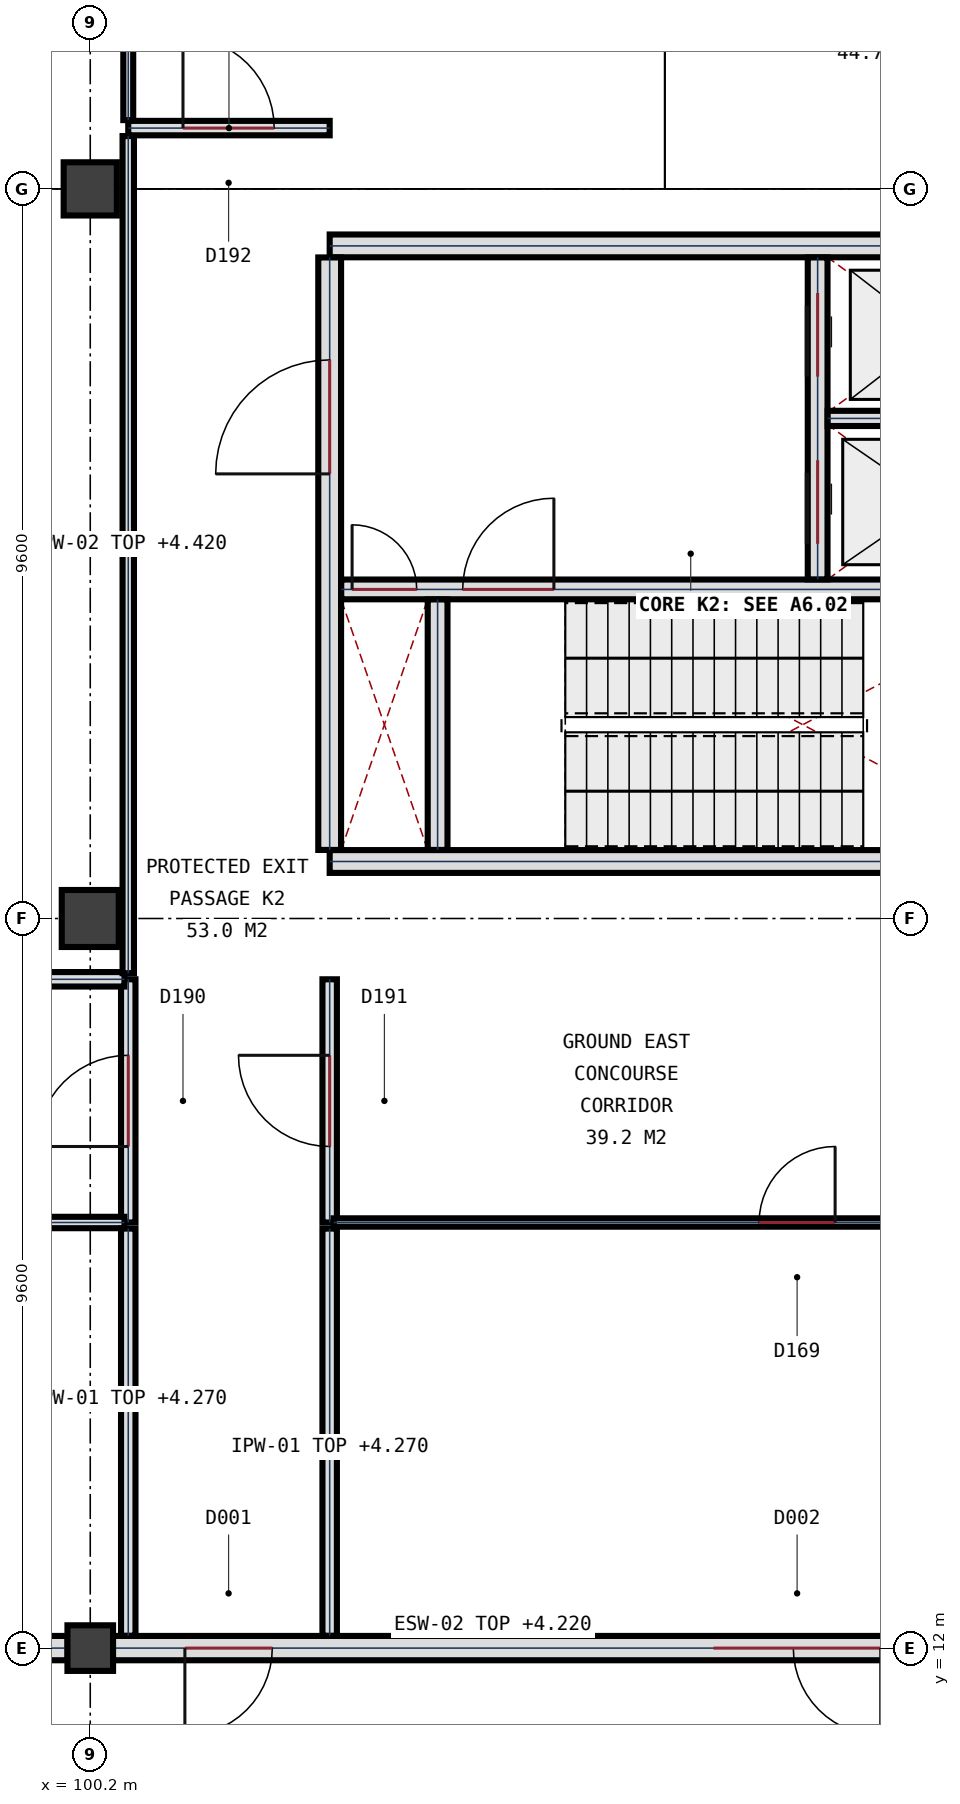
"""IFC4 building model, lengths in metres.
Left out: names, types, materials, properties, quantities, classifications, styles, units other than length and angle.
Written with IfcOpenShell. Run it as: python <this file> out.ifc"""

import sys

from ifc_helpers import new_model, si_unit, direction, frame, frame_2d, origin, origin_2d, place, context, subcontext, project, spatial, rectangle, circle, extrude, element, fill, save


model = new_model("IFC4")
c1 = context("Model", 3, precision=1e-05, world=origin(), true_north=direction((0.0, 1.0)))
c2 = subcontext(c1, "Body", "Model", "MODEL_VIEW")
j1 = project(units=[si_unit("LENGTHUNIT", "METRE"), si_unit("PLANEANGLEUNIT", "RADIAN")], contexts=[c1])
p1 = place(None, origin())
s1 = spatial("IfcSite", under=j1, at=p1, CompositionType="ELEMENT")
p2 = place(p1, origin())
s2 = spatial("IfcBuilding", under=s1, at=p2, CompositionType="ELEMENT")
p3 = place(p2, origin())
s3 = spatial("IfcBuildingStorey", under=s2, at=p3, CompositionType="ELEMENT", Elevation=0.0)
p4 = place(p3, frame((100.2, 12.0, 0.0), z_axis=(0.0, 0.0, 1.0), x_axis=(1.0, 0.0, 0.0)))
e1 = element("IfcColumn", 1, at=p4, inside=s3, PredefinedType="COLUMN", context=c2, shape_type="SweptSolid", body=[
    extrude(circle(Radius=0.3, at=origin_2d()), origin(), (0.0, 0.0, 1.0), 5.4),
])
p5 = place(p3, frame((100.2, 21.6, 0.0), z_axis=(0.0, 0.0, 1.0), x_axis=(1.0, 0.0, 0.0)))
e2 = element("IfcColumn", 2, at=p5, inside=s3, PredefinedType="COLUMN", context=c2, shape_type="SweptSolid", body=[
    extrude(rectangle(XDim=0.75, YDim=0.75, at=origin_2d()), origin(), (0.0, 0.0, 1.0), 5.4),
])
p6 = place(p3, frame((100.2, 31.2, 0.0), z_axis=(0.0, 0.0, 1.0), x_axis=(1.0, 0.0, 0.0)))
e3 = element("IfcColumn", 3, at=p6, inside=s3, PredefinedType="COLUMN", context=c2, shape_type="SweptSolid", body=[
    extrude(rectangle(XDim=0.7, YDim=0.7, at=origin_2d()), origin(), (0.0, 0.0, 1.0), 5.4),
])
p7 = place(p3, frame((113.477, 12.0, 0.0), z_axis=(0.0, 0.0, 1.0), x_axis=(-1.0, 0.0, 0.0)))
e4 = element("IfcWall", 4, at=p7, inside=s3, PredefinedType="SOLIDWALL", context=c2, shape_type="SweptSolid", body=[
    extrude(rectangle(XDim=12.979, YDim=0.32, at=frame_2d((6.49, 0.0))), origin(), (0.0, 0.0, 1.0), 4.22),
])
p8 = place(p7, frame((10.882, 0.0, 0.0)))
e5 = element("IfcOpeningElement", 5, at=p8, cuts=e4, PredefinedType="OPENING", context=c2, shape_type="SweptSolid", body=[
    extrude(rectangle(XDim=1.15, YDim=2.15, at=frame_2d((0.575, 1.075))), frame((0.0, 0.17, 0.0), z_axis=(0.0, -1.0, 0.0), x_axis=(1.0, 0.0, 0.0)), (0.0, 0.0, 1.0), 0.34),
])
p9 = place(p7, frame((2.877, 0.0, 0.0)))
e6 = element("IfcOpeningElement", 6, at=p9, cuts=e4, PredefinedType="OPENING", context=c2, shape_type="SweptSolid", body=[
    extrude(rectangle(XDim=2.2, YDim=2.45, at=frame_2d((1.1, 1.225))), frame((0.0, 0.17, 0.0), z_axis=(0.0, -1.0, 0.0), x_axis=(1.0, 0.0, 0.0)), (0.0, 0.0, 1.0), 0.34),
])
p10 = place(p3, frame((99.902, 12.0, 0.0), z_axis=(0.0, 0.0, 1.0), x_axis=(-1.0, 0.0, 0.0)))
e7 = element("IfcWall", 7, at=p10, inside=s3, PredefinedType="SOLIDWALL", context=c2, shape_type="SweptSolid", body=[
    extrude(rectangle(XDim=12.754, YDim=0.32, at=frame_2d((6.377, 0.0))), origin(), (0.0, 0.0, 1.0), 3.84),
])
p11 = place(p10, frame((2.471, 0.0, 0.0)))
e8 = element("IfcOpeningElement", 8, at=p11, cuts=e7, PredefinedType="OPENING", context=c2, shape_type="SweptSolid", body=[
    extrude(rectangle(XDim=2.2, YDim=2.45, at=frame_2d((1.1, 1.225))), frame((0.0, 0.17, 0.0), z_axis=(0.0, -1.0, 0.0), x_axis=(1.0, 0.0, 0.0)), (0.0, 0.0, 1.0), 0.34),
])
p12 = place(p10, frame((8.083, 0.0, 0.0)))
e9 = element("IfcOpeningElement", 9, at=p12, cuts=e7, PredefinedType="OPENING", context=c2, shape_type="SweptSolid", body=[
    extrude(rectangle(XDim=2.2, YDim=2.45, at=frame_2d((1.1, 1.225))), frame((0.0, 0.17, 0.0), z_axis=(0.0, -1.0, 0.0), x_axis=(1.0, 0.0, 0.0)), (0.0, 0.0, 1.0), 0.34),
])
for number, where, z_axis, x_axis in (
    (10, (112.85, 22.35, 0.0), (0.0, 0.0, 1.0), (-1.0, 0.0, 0.0)),
    (11, (103.35, 30.45, 0.0), (0.0, 0.0, 1.0), (1.0, 0.0, 0.0)),
):
    element("IfcWall", number, at=place(p3, frame(where, z_axis=z_axis, x_axis=x_axis)), inside=s3, PredefinedType="SHEAR", context=c2, shape_type="SweptSolid", body=[
        extrude(rectangle(XDim=9.5, YDim=0.3, at=frame_2d((4.75, 0.0))), origin(), (0.0, 0.0, 1.0), 5.4),
    ])
p13 = place(p3, frame((103.35, 22.502, 0.0), z_axis=(0.0, 0.0, 1.0), x_axis=(0.0, 1.0, 0.0)))
e12 = element("IfcWall", 12, at=p13, inside=s3, PredefinedType="SHEAR", context=c2, shape_type="SweptSolid", body=[
    extrude(rectangle(XDim=7.796, YDim=0.3, at=frame_2d((3.898, 0.0))), origin(), (0.0, 0.0, 1.0), 5.4),
])
p14 = place(p13, frame((4.948, 0.0, 0.0)))
e13 = element("IfcOpeningElement", 13, at=p14, cuts=e12, PredefinedType="OPENING", context=c2, shape_type="SweptSolid", body=[
    extrude(rectangle(XDim=1.5, YDim=2.25, at=frame_2d((0.75, 1.125))), frame((0.0, 0.16, 0.0), z_axis=(0.0, -1.0, 0.0), x_axis=(1.0, 0.0, 0.0)), (0.0, 0.0, 1.0), 0.32),
])
p15 = place(p3, frame((103.502, 25.93, 0.0), z_axis=(0.0, 0.0, 1.0), x_axis=(1.0, 0.0, 0.0)))
e14 = element("IfcWall", 14, at=p15, inside=s3, PredefinedType="SHEAR", context=c2, shape_type="SweptSolid", body=[
    extrude(rectangle(XDim=9.196, YDim=0.26, at=frame_2d((4.598, 0.0))), origin(), (0.0, 0.0, 1.0), 5.4),
])
p16 = place(p15, frame((1.598, 0.0, 0.0)))
e15 = element("IfcOpeningElement", 15, at=p16, cuts=e14, PredefinedType="OPENING", context=c2, shape_type="SweptSolid", body=[
    extrude(rectangle(XDim=1.2, YDim=2.2, at=frame_2d((0.6, 1.1))), frame((0.0, 0.14, 0.0), z_axis=(0.0, -1.0, 0.0), x_axis=(1.0, 0.0, 0.0)), (0.0, 0.0, 1.0), 0.28),
])
p17 = place(p15, frame((0.143, 0.0, 0.0)))
e16 = element("IfcOpeningElement", 16, at=p17, cuts=e14, PredefinedType="OPENING", context=c2, shape_type="SweptSolid", body=[
    extrude(rectangle(XDim=0.85, YDim=2.05, at=frame_2d((0.425, 1.025))), frame((0.0, 0.14, 0.0), z_axis=(0.0, -1.0, 0.0), x_axis=(1.0, 0.0, 0.0)), (0.0, 0.0, 1.0), 0.28),
])
p18 = place(p3, frame((104.77, 22.502, 0.0), z_axis=(0.0, 0.0, 1.0), x_axis=(0.0, 1.0, 0.0)))
e17 = element("IfcWall", 17, at=p18, inside=s3, PredefinedType="SHEAR", context=c2, shape_type="SweptSolid", body=[
    extrude(rectangle(XDim=3.296, YDim=0.26, at=frame_2d((1.648, 0.0))), origin(), (0.0, 0.0, 1.0), 5.4),
])
p19 = place(p3, frame((109.77, 26.062, 0.0), z_axis=(0.0, 0.0, 1.0), x_axis=(0.0, 1.0, 0.0)))
e18 = element("IfcWall", 18, at=p19, inside=s3, PredefinedType="SHEAR", context=c2, shape_type="SweptSolid", body=[
    extrude(rectangle(XDim=4.236, YDim=0.26, at=frame_2d((2.118, 0.0))), origin(), (0.0, 0.0, 1.0), 5.4),
])
p20 = place(p19, frame((0.468, 0.0, 0.0)))
e19 = element("IfcOpeningElement", 19, at=p20, cuts=e18, PredefinedType="OPENING", context=c2, shape_type="SweptSolid", body=[
    extrude(rectangle(XDim=1.1, YDim=2.15, at=frame_2d((0.55, 1.075))), frame((0.0, 0.14, 0.0), z_axis=(0.0, -1.0, 0.0), x_axis=(1.0, 0.0, 0.0)), (0.0, 0.0, 1.0), 0.28),
])
p21 = place(p19, frame((2.668, 0.0, 0.0)))
e20 = element("IfcOpeningElement", 20, at=p21, cuts=e18, PredefinedType="OPENING", context=c2, shape_type="SweptSolid", body=[
    extrude(rectangle(XDim=1.1, YDim=2.15, at=frame_2d((0.55, 1.075))), frame((0.0, 0.14, 0.0), z_axis=(0.0, -1.0, 0.0), x_axis=(1.0, 0.0, 0.0)), (0.0, 0.0, 1.0), 0.28),
])
p22 = place(p3, frame((109.902, 28.18, 0.0), z_axis=(0.0, 0.0, 1.0), x_axis=(1.0, 0.0, 0.0)))
e21 = element("IfcWall", 21, at=p22, inside=s3, PredefinedType="PLUMBINGWALL", context=c2, shape_type="SweptSolid", body=[
    extrude(rectangle(XDim=2.796, YDim=0.2, at=frame_2d((1.398, 0.0))), origin(), (0.0, 0.0, 1.0), 5.08),
])
p23 = place(p3, frame((100.7, 32.0, 0.0), z_axis=(0.0, 0.0, 1.0), x_axis=(1.0, 0.0, 0.0)))
e22 = element("IfcWall", 22, at=p23, inside=s3, PredefinedType="PARTITIONING", context=c2, shape_type="SweptSolid", body=[
    extrude(rectangle(XDim=2.65, YDim=0.19, at=frame_2d((1.325, 0.0))), origin(), (0.0, 0.0, 1.0), 5.16),
])
p24 = place(p23, frame((0.72, 0.0, 0.0)))
e23 = element("IfcOpeningElement", 23, at=p24, cuts=e22, PredefinedType="OPENING", context=c2, shape_type="SweptSolid", body=[
    extrude(rectangle(XDim=1.2, YDim=2.2, at=frame_2d((0.6, 1.1))), frame((0.0, 0.105, 0.0), z_axis=(0.0, -1.0, 0.0), x_axis=(1.0, 0.0, 0.0)), (0.0, 0.0, 1.0), 0.21),
])
p25 = place(p3, frame((100.7, 17.6, 0.0), z_axis=(0.0, 0.0, 1.0), x_axis=(0.0, 1.0, 0.0)))
e24 = element("IfcWall", 24, at=p25, inside=s3, PredefinedType="PARTITIONING", context=c2, shape_type="SweptSolid", body=[
    extrude(rectangle(XDim=3.2, YDim=0.19, at=frame_2d((1.6, 0.0))), origin(), (0.0, 0.0, 1.0), 5.08),
])
p26 = place(p25, frame((1.0, 0.0, 0.0)))
e25 = element("IfcOpeningElement", 25, at=p26, cuts=e24, PredefinedType="OPENING", context=c2, shape_type="SweptSolid", body=[
    extrude(rectangle(XDim=1.2, YDim=2.2, at=frame_2d((0.6, 1.1))), frame((0.0, 0.105, 0.0), z_axis=(0.0, -1.0, 0.0), x_axis=(1.0, 0.0, 0.0)), (0.0, 0.0, 1.0), 0.21),
])
p27 = place(p3, frame((103.35, 17.6, 0.0), z_axis=(0.0, 0.0, 1.0), x_axis=(0.0, 1.0, 0.0)))
e26 = element("IfcWall", 26, at=p27, inside=s3, PredefinedType="PARTITIONING", context=c2, shape_type="SweptSolid", body=[
    extrude(rectangle(XDim=3.2, YDim=0.19, at=frame_2d((1.6, 0.0))), origin(), (0.0, 0.0, 1.0), 5.08),
])
p28 = place(p27, frame((1.0, 0.0, 0.0)))
e27 = element("IfcOpeningElement", 27, at=p28, cuts=e26, PredefinedType="OPENING", context=c2, shape_type="SweptSolid", body=[
    extrude(rectangle(XDim=1.2, YDim=2.2, at=frame_2d((0.6, 1.1))), frame((0.0, 0.105, 0.0), z_axis=(0.0, -1.0, 0.0), x_axis=(1.0, 0.0, 0.0)), (0.0, 0.0, 1.0), 0.21),
])
p29 = place(p3, frame((59.28, 20.8, 0.0), z_axis=(0.0, 0.0, 1.0), x_axis=(1.0, 0.0, 0.0)))
e28 = element("IfcWall", 28, at=p29, inside=s3, PredefinedType="PARTITIONING", context=c2, shape_type="SweptSolid", body=[
    extrude(rectangle(XDim=41.37, YDim=0.19, at=frame_2d((20.685, 0.0))), origin(), (0.0, 0.0, 1.0), 4.42),
])
p30 = place(p29, frame((19.795, 0.0, 0.0)))
e29 = element("IfcOpeningElement", 29, at=p30, cuts=e28, PredefinedType="OPENING", context=c2, shape_type="SweptSolid", body=[
    extrude(rectangle(XDim=1.85, YDim=2.35, at=frame_2d((0.925, 1.175))), frame((0.0, 0.105, 0.0), z_axis=(0.0, -1.0, 0.0), x_axis=(1.0, 0.0, 0.0)), (0.0, 0.0, 1.0), 0.21),
])
p31 = place(p3, frame((84.25, 17.6, 0.0), z_axis=(0.0, 0.0, 1.0), x_axis=(1.0, 0.0, 0.0)))
e30 = element("IfcWall", 30, at=p31, inside=s3, PredefinedType="PARTITIONING", context=c2, shape_type="SweptSolid", body=[
    extrude(rectangle(XDim=16.4, YDim=0.15, at=frame_2d((8.2, 0.0))), origin(), (0.0, 0.0, 1.0), 4.42),
])
p32 = place(p31, frame((8.75, 0.0, 0.0)))
e31 = element("IfcOpeningElement", 31, at=p32, cuts=e30, PredefinedType="OPENING", context=c2, shape_type="SweptSolid", body=[
    extrude(rectangle(XDim=1.0, YDim=2.2, at=frame_2d((0.5, 1.1))), frame((0.0, 0.085, 0.0), z_axis=(0.0, -1.0, 0.0), x_axis=(1.0, 0.0, 0.0)), (0.0, 0.0, 1.0), 0.17),
])
p33 = place(p3, frame((103.4, 17.6, 0.0), z_axis=(0.0, 0.0, 1.0), x_axis=(1.0, 0.0, 0.0)))
e32 = element("IfcWall", 32, at=p33, inside=s3, PredefinedType="PARTITIONING", context=c2, shape_type="SweptSolid", body=[
    extrude(rectangle(XDim=12.57, YDim=0.11, at=frame_2d((6.285, 0.0))), origin(), (0.0, 0.0, 1.0), 4.42),
])
p34 = place(p33, frame((5.6, 0.0, 0.0)))
e33 = element("IfcOpeningElement", 33, at=p34, cuts=e32, PredefinedType="OPENING", context=c2, shape_type="SweptSolid", body=[
    extrude(rectangle(XDim=1.0, YDim=2.2, at=frame_2d((0.5, 1.1))), frame((0.0, 0.065, 0.0), z_axis=(0.0, -1.0, 0.0), x_axis=(1.0, 0.0, 0.0)), (0.0, 0.0, 1.0), 0.13),
])
p35 = place(p3, frame((100.7, 12.163, 0.0), z_axis=(0.0, 0.0, 1.0), x_axis=(0.0, 1.0, 0.0)))
e34 = element("IfcWall", 34, at=p35, inside=s3, PredefinedType="PARTITIONING", context=c2, shape_type="SweptSolid", body=[
    extrude(rectangle(XDim=5.357, YDim=0.19, at=frame_2d((2.678, 0.0))), origin(), (0.0, 0.0, 1.0), 4.27),
])
p36 = place(p3, frame((100.7, 20.88, 0.0), z_axis=(0.0, 0.0, 1.0), x_axis=(0.0, 1.0, 0.0)))
e35 = element("IfcWall", 35, at=p36, inside=s3, PredefinedType="PARTITIONING", context=c2, shape_type="SweptSolid", body=[
    extrude(rectangle(XDim=11.015, YDim=0.15, at=frame_2d((5.508, 0.0))), origin(), (0.0, 0.0, 1.0), 4.42),
])
p37 = place(p3, frame((100.7, 32.105, 0.0), z_axis=(0.0, 0.0, 1.0), x_axis=(0.0, 1.0, 0.0)))
e36 = element("IfcWall", 36, at=p37, inside=s3, PredefinedType="PARTITIONING", context=c2, shape_type="SweptSolid", body=[
    extrude(rectangle(XDim=2.79, YDim=0.13, at=frame_2d((1.395, 0.0))), origin(), (0.0, 0.0, 1.0), 5.16),
])
p38 = place(p3, frame((103.35, 12.163, 0.0), z_axis=(0.0, 0.0, 1.0), x_axis=(0.0, 1.0, 0.0)))
e37 = element("IfcWall", 37, at=p38, inside=s3, PredefinedType="PARTITIONING", context=c2, shape_type="SweptSolid", body=[
    extrude(rectangle(XDim=5.357, YDim=0.19, at=frame_2d((2.678, 0.0))), origin(), (0.0, 0.0, 1.0), 4.27),
])
p39 = place(p8, origin())
e38 = element("IfcDoor", 38, at=p39, inside=s3, OperationType="SINGLE_SWING_RIGHT", PredefinedType="DOOR", context=c2, shape_type="SweptSolid", body=[
    extrude(rectangle(XDim=1.15, YDim=2.15, at=frame_2d((0.575, 1.075))), frame((0.0, 0.032, 0.0), z_axis=(0.0, -1.0, 0.0), x_axis=(1.0, 0.0, 0.0)), (0.0, 0.0, 1.0), 0.065),
])
fill(e5, e38)
p40 = place(p9, origin())
e39 = element("IfcDoor", 39, at=p40, inside=s3, OperationType="SINGLE_SWING_LEFT", PredefinedType="DOOR", context=c2, shape_type="SweptSolid", body=[
    extrude(rectangle(XDim=2.2, YDim=2.45, at=frame_2d((1.1, 1.225))), frame((0.0, 0.032, 0.0), z_axis=(0.0, -1.0, 0.0), x_axis=(1.0, 0.0, 0.0)), (0.0, 0.0, 1.0), 0.065),
])
fill(e6, e39)
p41 = place(p14, origin())
e40 = element("IfcDoor", 40, at=p41, inside=s3, OperationType="SINGLE_SWING_LEFT", PredefinedType="DOOR", context=c2, shape_type="SweptSolid", body=[
    extrude(rectangle(XDim=1.5, YDim=2.25, at=frame_2d((0.75, 1.125))), frame((0.0, 0.032, 0.0), z_axis=(0.0, -1.0, 0.0), x_axis=(1.0, 0.0, 0.0)), (0.0, 0.0, 1.0), 0.065),
])
fill(e13, e40)
p42 = place(p16, origin())
e41 = element("IfcDoor", 41, at=p42, inside=s3, OperationType="SINGLE_SWING_RIGHT", PredefinedType="DOOR", context=c2, shape_type="SweptSolid", body=[
    extrude(rectangle(XDim=1.2, YDim=2.2, at=frame_2d((0.6, 1.1))), frame((0.0, 0.032, 0.0), z_axis=(0.0, -1.0, 0.0), x_axis=(1.0, 0.0, 0.0)), (0.0, 0.0, 1.0), 0.065),
])
fill(e15, e41)
p43 = place(p17, origin())
e42 = element("IfcDoor", 42, at=p43, inside=s3, OperationType="SINGLE_SWING_LEFT", PredefinedType="DOOR", context=c2, shape_type="SweptSolid", body=[
    extrude(rectangle(XDim=0.85, YDim=2.05, at=frame_2d((0.425, 1.025))), frame((0.0, 0.032, 0.0), z_axis=(0.0, -1.0, 0.0), x_axis=(1.0, 0.0, 0.0)), (0.0, 0.0, 1.0), 0.065),
])
fill(e16, e42)
p44 = place(p20, origin())
e43 = element("IfcDoor", 43, at=p44, inside=s3, OperationType="SLIDING_TO_LEFT", PredefinedType="DOOR", context=c2, shape_type="SweptSolid", body=[
    extrude(rectangle(XDim=1.1, YDim=2.15, at=frame_2d((0.55, 1.075))), frame((0.0, 0.032, 0.0), z_axis=(0.0, -1.0, 0.0), x_axis=(1.0, 0.0, 0.0)), (0.0, 0.0, 1.0), 0.065),
])
fill(e19, e43)
p45 = place(p21, origin())
e44 = element("IfcDoor", 44, at=p45, inside=s3, OperationType="SLIDING_TO_LEFT", PredefinedType="DOOR", context=c2, shape_type="SweptSolid", body=[
    extrude(rectangle(XDim=1.1, YDim=2.15, at=frame_2d((0.55, 1.075))), frame((0.0, 0.032, 0.0), z_axis=(0.0, -1.0, 0.0), x_axis=(1.0, 0.0, 0.0)), (0.0, 0.0, 1.0), 0.065),
])
fill(e20, e44)
p46 = place(p34, origin())
e45 = element("IfcDoor", 45, at=p46, inside=s3, OperationType="SINGLE_SWING_RIGHT", PredefinedType="DOOR", context=c2, shape_type="SweptSolid", body=[
    extrude(rectangle(XDim=1.0, YDim=2.2, at=frame_2d((0.5, 1.1))), frame((0.0, 0.032, 0.0), z_axis=(0.0, -1.0, 0.0), x_axis=(1.0, 0.0, 0.0)), (0.0, 0.0, 1.0), 0.065),
])
fill(e33, e45)
p47 = place(p26, origin())
e46 = element("IfcDoor", 46, at=p47, inside=s3, OperationType="SINGLE_SWING_LEFT", PredefinedType="DOOR", context=c2, shape_type="SweptSolid", body=[
    extrude(rectangle(XDim=1.2, YDim=2.2, at=frame_2d((0.6, 1.1))), frame((0.0, 0.032, 0.0), z_axis=(0.0, -1.0, 0.0), x_axis=(1.0, 0.0, 0.0)), (0.0, 0.0, 1.0), 0.065),
])
fill(e25, e46)
p48 = place(p28, origin())
e47 = element("IfcDoor", 47, at=p48, inside=s3, OperationType="SINGLE_SWING_RIGHT", PredefinedType="DOOR", context=c2, shape_type="SweptSolid", body=[
    extrude(rectangle(XDim=1.2, YDim=2.2, at=frame_2d((0.6, 1.1))), frame((0.0, 0.032, 0.0), z_axis=(0.0, -1.0, 0.0), x_axis=(1.0, 0.0, 0.0)), (0.0, 0.0, 1.0), 0.065),
])
fill(e27, e47)
p49 = place(p24, origin())
e48 = element("IfcDoor", 48, at=p49, inside=s3, OperationType="SINGLE_SWING_LEFT", PredefinedType="DOOR", context=c2, shape_type="SweptSolid", body=[
    extrude(rectangle(XDim=1.2, YDim=2.2, at=frame_2d((0.6, 1.1))), frame((0.0, 0.032, 0.0), z_axis=(0.0, -1.0, 0.0), x_axis=(1.0, 0.0, 0.0)), (0.0, 0.0, 1.0), 0.065),
])
fill(e23, e48)
save(model, sys.argv[1])
